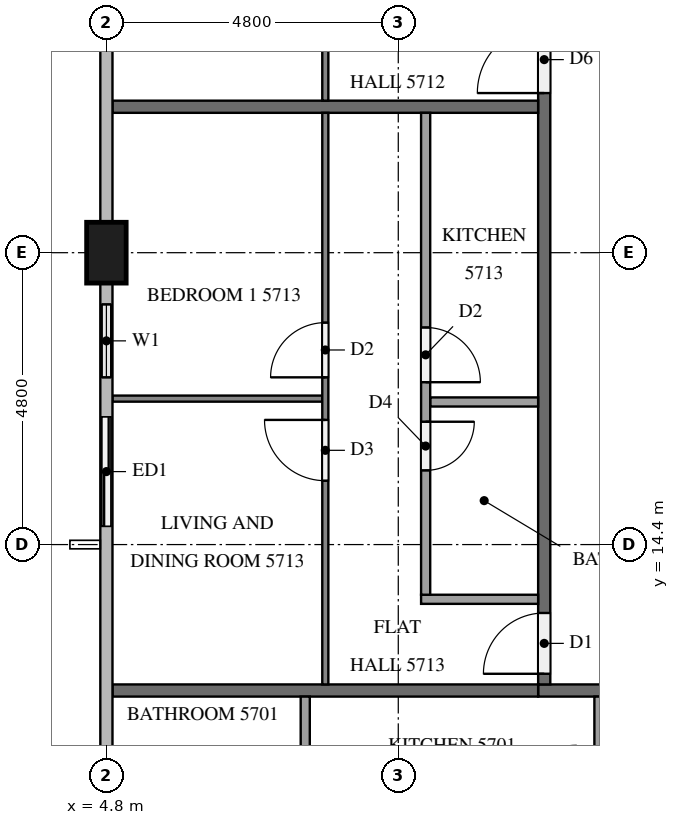
"""IFC4 building model, lengths in metres.
Left out: names, types, materials, properties, quantities, classifications, styles, units other than length and angle.
Written with IfcOpenShell. Run it as: python <this file> out.ifc"""

import sys

from ifc_helpers import new_model, si_unit, direction, frame, frame_2d, origin, origin_2d, place, context, subcontext, project, spatial, rectangle, extrude, element, fill, save


model = new_model("IFC4")
c1 = context("Model", 3, precision=1e-05, world=origin(), true_north=direction((0.0, 1.0)))
c2 = subcontext(c1, "Body", "Model", "MODEL_VIEW")
j1 = project(units=[si_unit("LENGTHUNIT", "METRE"), si_unit("PLANEANGLEUNIT", "RADIAN")], contexts=[c1])
p1 = place(None, origin())
s1 = spatial("IfcSite", under=j1, at=p1, CompositionType="ELEMENT")
p2 = place(p1, origin())
s2 = spatial("IfcBuilding", under=s1, at=p2, CompositionType="ELEMENT")
p3 = place(p2, frame((0.0, 0.0, 219.3)))
s3 = spatial("IfcBuildingStorey", under=s2, at=p3, CompositionType="ELEMENT", Elevation=219.3)
p4 = place(p3, frame((4.8, 19.2, 0.0), z_axis=(0.0, 0.0, 1.0), x_axis=(0.0, 1.0, 0.0)))
e1 = element("IfcColumn", 1, at=p4, inside=s3, PredefinedType="COLUMN", context=c2, shape_type="SweptSolid", body=[
    extrude(rectangle(XDim=1.0, YDim=0.65, at=origin_2d()), origin(), (0.0, 0.0, 1.0), 3.2),
])
p5 = place(p3, frame((4.8, 18.7, 0.0), z_axis=(0.0, 0.0, 1.0), x_axis=(0.0, -1.0, 0.0)))
e2 = element("IfcWall", 2, at=p5, inside=s3, PredefinedType="SOLIDWALL", context=c2, shape_type="SweptSolid", body=[
    extrude(rectangle(XDim=4.3, YDim=0.15, at=frame_2d((2.15, 0.0))), origin(), (0.0, 0.0, 1.0), 3.2),
])
p6 = place(p5, frame((0.35, 0.0, 0.9)))
e3 = element("IfcOpeningElement", 3, at=p6, cuts=e2, PredefinedType="OPENING", context=c2, shape_type="SweptSolid", body=[
    extrude(rectangle(XDim=1.2, YDim=1.4, at=frame_2d((0.6, 0.7))), frame((0.0, 0.085, 0.0), z_axis=(0.0, -1.0, 0.0), x_axis=(1.0, 0.0, 0.0)), (0.0, 0.0, 1.0), 0.17),
])
p7 = place(p5, frame((2.2, 0.0, 0.0)))
e4 = element("IfcOpeningElement", 4, at=p7, cuts=e2, PredefinedType="OPENING", context=c2, shape_type="SweptSolid", body=[
    extrude(rectangle(XDim=1.8, YDim=2.4, at=frame_2d((0.9, 1.2))), frame((0.0, 0.085, 0.0), z_axis=(0.0, -1.0, 0.0), x_axis=(1.0, 0.0, 0.0)), (0.0, 0.0, 1.0), 0.17),
])
p8 = place(p3, frame((50.5, 12.0, 0.0), z_axis=(0.0, 0.0, 1.0), x_axis=(-1.0, 0.0, 0.0)))
e5 = element("IfcWall", 5, at=p8, inside=s3, PredefinedType="PARTITIONING", context=c2, shape_type="SweptSolid", body=[
    extrude(rectangle(XDim=38.6, YDim=0.2, at=frame_2d((19.3, 0.0))), origin(), (0.0, 0.0, 1.0), 3.2),
])
p9 = place(p8, frame((36.375, 0.0, 0.0)))
e6 = element("IfcOpeningElement", 6, at=p9, cuts=e5, PredefinedType="OPENING", context=c2, shape_type="SweptSolid", body=[
    extrude(rectangle(XDim=1.0, YDim=2.1, at=frame_2d((0.5, 1.05))), frame((0.0, 0.11, 0.0), z_axis=(0.0, -1.0, 0.0), x_axis=(1.0, 0.0, 0.0)), (0.0, 0.0, 1.0), 0.22),
])
p10 = place(p8, frame((34.825, 0.0, 0.0)))
e7 = element("IfcOpeningElement", 7, at=p10, cuts=e5, PredefinedType="OPENING", context=c2, shape_type="SweptSolid", body=[
    extrude(rectangle(XDim=1.0, YDim=2.1, at=frame_2d((0.5, 1.05))), frame((0.0, 0.11, 0.0), z_axis=(0.0, -1.0, 0.0), x_axis=(1.0, 0.0, 0.0)), (0.0, 0.0, 1.0), 0.22),
])
p11 = place(p8, frame((20.375, 0.0, 0.0)))
e8 = element("IfcOpeningElement", 8, at=p11, cuts=e5, PredefinedType="OPENING", context=c2, shape_type="SweptSolid", body=[
    extrude(rectangle(XDim=1.1, YDim=2.1, at=frame_2d((0.55, 1.05))), frame((0.0, 0.11, 0.0), z_axis=(0.0, -1.0, 0.0), x_axis=(1.0, 0.0, 0.0)), (0.0, 0.0, 1.0), 0.22),
])
p12 = place(p8, frame((1.225, 0.0, 0.0)))
e9 = element("IfcOpeningElement", 9, at=p12, cuts=e5, PredefinedType="OPENING", context=c2, shape_type="SweptSolid", body=[
    extrude(rectangle(XDim=1.0, YDim=2.1, at=frame_2d((0.5, 1.05))), frame((0.0, 0.11, 0.0), z_axis=(0.0, -1.0, 0.0), x_axis=(1.0, 0.0, 0.0)), (0.0, 0.0, 1.0), 0.22),
])
p13 = place(p3, frame((12.0, 12.1, 0.0), z_axis=(0.0, 0.0, 1.0), x_axis=(0.0, 1.0, 0.0)))
e10 = element("IfcWall", 10, at=p13, inside=s3, PredefinedType="PARTITIONING", context=c2, shape_type="SweptSolid", body=[
    extrude(rectangle(XDim=28.6, YDim=0.2, at=frame_2d((14.3, 0.0))), origin(), (0.0, 0.0, 1.0), 3.2),
])
p14 = place(p13, frame((9.725, 0.0, 0.0)))
e11 = element("IfcOpeningElement", 11, at=p14, cuts=e10, PredefinedType="OPENING", context=c2, shape_type="SweptSolid", body=[
    extrude(rectangle(XDim=1.1, YDim=2.1, at=frame_2d((0.55, 1.05))), frame((0.0, 0.11, 0.0), z_axis=(0.0, -1.0, 0.0), x_axis=(1.0, 0.0, 0.0)), (0.0, 0.0, 1.0), 0.22),
])
p15 = place(p13, frame((0.175, 0.0, 0.0)))
e12 = element("IfcOpeningElement", 12, at=p15, cuts=e10, PredefinedType="OPENING", context=c2, shape_type="SweptSolid", body=[
    extrude(rectangle(XDim=1.0, YDim=2.1, at=frame_2d((0.5, 1.05))), frame((0.0, 0.11, 0.0), z_axis=(0.0, -1.0, 0.0), x_axis=(1.0, 0.0, 0.0)), (0.0, 0.0, 1.0), 0.22),
])
for number, where, z_axis, x_axis in (
    (13, (4.9, 12.0, 0.0), (0.0, 0.0, 1.0), (1.0, 0.0, 0.0)),
    (14, (4.9, 21.6, 0.0), (0.0, 0.0, 1.0), (1.0, 0.0, 0.0)),
):
    element("IfcWall", number, at=place(p3, frame(where, z_axis=z_axis, x_axis=x_axis)), inside=s3, PredefinedType="PARTITIONING", context=c2, shape_type="SweptSolid", body=[
        extrude(rectangle(XDim=7.0, YDim=0.2, at=frame_2d((3.5, 0.0))), origin(), (0.0, 0.0, 1.0), 3.2),
    ])
p16 = place(p3, frame((8.07, 11.9, 0.0), z_axis=(0.0, 0.0, 1.0), x_axis=(0.0, -1.0, 0.0)))
e15 = element("IfcWall", 15, at=p16, inside=s3, PredefinedType="PARTITIONING", context=c2, shape_type="SweptSolid", body=[
    extrude(rectangle(XDim=1.625, YDim=0.15, at=frame_2d((0.812, 0.0))), origin(), (0.0, 0.0, 1.0), 3.2),
])
p17 = place(p3, frame((12.9, 11.9, 0.0), z_axis=(0.0, 0.0, 1.0), x_axis=(0.0, -1.0, 0.0)))
e16 = element("IfcWall", 16, at=p17, inside=s3, PredefinedType="PARTITIONING", context=c2, shape_type="SweptSolid", body=[
    extrude(rectangle(XDim=1.775, YDim=0.15, at=frame_2d((0.887, 0.0))), origin(), (0.0, 0.0, 1.0), 3.2),
])
p18 = place(p3, frame((8.4, 21.7, 0.0), z_axis=(0.0, 0.0, 1.0), x_axis=(0.0, 1.0, 0.0)))
e17 = element("IfcWall", 17, at=p18, inside=s3, PredefinedType="PARTITIONING", context=c2, shape_type="SweptSolid", body=[
    extrude(rectangle(XDim=19.0, YDim=0.1, at=frame_2d((9.5, 0.0))), origin(), (0.0, 0.0, 1.0), 3.2),
])
p19 = place(p18, frame((3.45, 0.0, 0.0)))
e18 = element("IfcOpeningElement", 18, at=p19, cuts=e17, PredefinedType="OPENING", context=c2, shape_type="SweptSolid", body=[
    extrude(rectangle(XDim=0.9, YDim=2.1, at=frame_2d((0.45, 1.05))), frame((0.0, 0.06, 0.0), z_axis=(0.0, -1.0, 0.0), x_axis=(1.0, 0.0, 0.0)), (0.0, 0.0, 1.0), 0.12),
])
p20 = place(p18, frame((5.05, 0.0, 0.0)))
e19 = element("IfcOpeningElement", 19, at=p20, cuts=e17, PredefinedType="OPENING", context=c2, shape_type="SweptSolid", body=[
    extrude(rectangle(XDim=0.9, YDim=2.1, at=frame_2d((0.45, 1.05))), frame((0.0, 0.06, 0.0), z_axis=(0.0, -1.0, 0.0), x_axis=(1.0, 0.0, 0.0)), (0.0, 0.0, 1.0), 0.12),
])
p21 = place(p18, frame((13.05, 0.0, 0.0)))
e20 = element("IfcOpeningElement", 20, at=p21, cuts=e17, PredefinedType="OPENING", context=c2, shape_type="SweptSolid", body=[
    extrude(rectangle(XDim=0.9, YDim=2.1, at=frame_2d((0.45, 1.05))), frame((0.0, 0.06, 0.0), z_axis=(0.0, -1.0, 0.0), x_axis=(1.0, 0.0, 0.0)), (0.0, 0.0, 1.0), 0.12),
])
p22 = place(p18, frame((14.65, 0.0, 0.0)))
e21 = element("IfcOpeningElement", 21, at=p22, cuts=e17, PredefinedType="OPENING", context=c2, shape_type="SweptSolid", body=[
    extrude(rectangle(XDim=1.0, YDim=2.1, at=frame_2d((0.5, 1.05))), frame((0.0, 0.06, 0.0), z_axis=(0.0, -1.0, 0.0), x_axis=(1.0, 0.0, 0.0)), (0.0, 0.0, 1.0), 0.12),
])
p23 = place(p3, frame((8.35, 16.8, 0.0), z_axis=(0.0, 0.0, 1.0), x_axis=(-1.0, 0.0, 0.0)))
e22 = element("IfcWall", 22, at=p23, inside=s3, PredefinedType="PARTITIONING", context=c2, shape_type="SweptSolid", body=[
    extrude(rectangle(XDim=3.45, YDim=0.1, at=frame_2d((1.725, 0.0))), origin(), (0.0, 0.0, 1.0), 3.2),
])
p24 = place(p3, frame((8.4, 12.1, 0.0), z_axis=(0.0, 0.0, 1.0), x_axis=(0.0, 1.0, 0.0)))
e23 = element("IfcWall", 23, at=p24, inside=s3, PredefinedType="PARTITIONING", context=c2, shape_type="SweptSolid", body=[
    extrude(rectangle(XDim=9.4, YDim=0.1, at=frame_2d((4.7, 0.0))), origin(), (0.0, 0.0, 1.0), 3.2),
])
p25 = place(p24, frame((3.35, 0.0, 0.0)))
e24 = element("IfcOpeningElement", 24, at=p25, cuts=e23, PredefinedType="OPENING", context=c2, shape_type="SweptSolid", body=[
    extrude(rectangle(XDim=1.0, YDim=2.1, at=frame_2d((0.5, 1.05))), frame((0.0, 0.06, 0.0), z_axis=(0.0, -1.0, 0.0), x_axis=(1.0, 0.0, 0.0)), (0.0, 0.0, 1.0), 0.12),
])
p26 = place(p24, frame((5.05, 0.0, 0.0)))
e25 = element("IfcOpeningElement", 25, at=p26, cuts=e23, PredefinedType="OPENING", context=c2, shape_type="SweptSolid", body=[
    extrude(rectangle(XDim=0.9, YDim=2.1, at=frame_2d((0.45, 1.05))), frame((0.0, 0.06, 0.0), z_axis=(0.0, -1.0, 0.0), x_axis=(1.0, 0.0, 0.0)), (0.0, 0.0, 1.0), 0.12),
])
p27 = place(p3, frame((11.9, 16.745, 0.0), z_axis=(0.0, 0.0, 1.0), x_axis=(-1.0, 0.0, 0.0)))
e26 = element("IfcWall", 26, at=p27, inside=s3, PredefinedType="PARTITIONING", context=c2, shape_type="SweptSolid", body=[
    extrude(rectangle(XDim=1.775, YDim=0.15, at=frame_2d((0.887, 0.0))), origin(), (0.0, 0.0, 1.0), 3.2),
])
p28 = place(p3, frame((11.9, 13.5, 0.0), z_axis=(0.0, 0.0, 1.0), x_axis=(-1.0, 0.0, 0.0)))
e27 = element("IfcWall", 27, at=p28, inside=s3, PredefinedType="PARTITIONING", context=c2, shape_type="SweptSolid", body=[
    extrude(rectangle(XDim=1.925, YDim=0.15, at=frame_2d((0.962, 0.0))), origin(), (0.0, 0.0, 1.0), 3.2),
])
p29 = place(p3, frame((10.05, 21.5, 0.0), z_axis=(0.0, 0.0, 1.0), x_axis=(0.0, -1.0, 0.0)))
e28 = element("IfcWall", 28, at=p29, inside=s3, PredefinedType="PARTITIONING", context=c2, shape_type="SweptSolid", body=[
    extrude(rectangle(XDim=7.925, YDim=0.15, at=frame_2d((3.962, 0.0))), origin(), (0.0, 0.0, 1.0), 3.2),
])
p30 = place(p29, frame((5.08, 0.0, 0.0)))
e29 = element("IfcOpeningElement", 29, at=p30, cuts=e28, PredefinedType="OPENING", context=c2, shape_type="SweptSolid", body=[
    extrude(rectangle(XDim=0.8, YDim=2.1, at=frame_2d((0.4, 1.05))), frame((0.0, 0.085, 0.0), z_axis=(0.0, -1.0, 0.0), x_axis=(1.0, 0.0, 0.0)), (0.0, 0.0, 1.0), 0.17),
])
p31 = place(p29, frame((3.53, 0.0, 0.0)))
e30 = element("IfcOpeningElement", 30, at=p31, cuts=e28, PredefinedType="OPENING", context=c2, shape_type="SweptSolid", body=[
    extrude(rectangle(XDim=0.9, YDim=2.1, at=frame_2d((0.45, 1.05))), frame((0.0, 0.085, 0.0), z_axis=(0.0, -1.0, 0.0), x_axis=(1.0, 0.0, 0.0)), (0.0, 0.0, 1.0), 0.17),
])
p32 = place(p6, origin())
e31 = element("IfcWindow", 31, at=p32, inside=s3, PartitioningType="SINGLE_PANEL", PredefinedType="WINDOW", context=c2, shape_type="SweptSolid", body=[
    extrude(rectangle(XDim=1.2, YDim=1.4, at=frame_2d((0.6, 0.7))), frame((0.0, 0.03, 0.0), z_axis=(0.0, -1.0, 0.0), x_axis=(1.0, 0.0, 0.0)), (0.0, 0.0, 1.0), 0.06),
])
fill(e3, e31)
p33 = place(p7, origin())
e32 = element("IfcDoor", 32, at=p33, inside=s3, OperationType="SLIDING_TO_LEFT", PredefinedType="DOOR", context=c2, shape_type="SweptSolid", body=[
    extrude(rectangle(XDim=1.8, YDim=2.4, at=frame_2d((0.9, 1.2))), frame((0.0, 0.025, 0.0), z_axis=(0.0, -1.0, 0.0), x_axis=(1.0, 0.0, 0.0)), (0.0, 0.0, 1.0), 0.05),
])
fill(e4, e32)
p34 = place(p14, origin())
e33 = element("IfcDoor", 33, at=p34, inside=s3, OperationType="SINGLE_SWING_LEFT", PredefinedType="DOOR", context=c2, shape_type="SweptSolid", body=[
    extrude(rectangle(XDim=1.1, YDim=2.1, at=frame_2d((0.55, 1.05))), frame((0.0, 0.025, 0.0), z_axis=(0.0, -1.0, 0.0), x_axis=(1.0, 0.0, 0.0)), (0.0, 0.0, 1.0), 0.05),
])
fill(e11, e33)
p35 = place(p15, origin())
e34 = element("IfcDoor", 34, at=p35, inside=s3, OperationType="SINGLE_SWING_LEFT", PredefinedType="DOOR", context=c2, shape_type="SweptSolid", body=[
    extrude(rectangle(XDim=1.0, YDim=2.1, at=frame_2d((0.5, 1.05))), frame((0.0, 0.025, 0.0), z_axis=(0.0, -1.0, 0.0), x_axis=(1.0, 0.0, 0.0)), (0.0, 0.0, 1.0), 0.05),
])
fill(e12, e34)
p36 = place(p25, origin())
e35 = element("IfcDoor", 35, at=p36, inside=s3, OperationType="SINGLE_SWING_RIGHT", PredefinedType="DOOR", context=c2, shape_type="SweptSolid", body=[
    extrude(rectangle(XDim=1.0, YDim=2.1, at=frame_2d((0.5, 1.05))), frame((0.0, 0.025, 0.0), z_axis=(0.0, -1.0, 0.0), x_axis=(1.0, 0.0, 0.0)), (0.0, 0.0, 1.0), 0.05),
])
fill(e24, e35)
p37 = place(p26, origin())
e36 = element("IfcDoor", 36, at=p37, inside=s3, OperationType="SINGLE_SWING_LEFT", PredefinedType="DOOR", context=c2, shape_type="SweptSolid", body=[
    extrude(rectangle(XDim=0.9, YDim=2.1, at=frame_2d((0.45, 1.05))), frame((0.0, 0.025, 0.0), z_axis=(0.0, -1.0, 0.0), x_axis=(1.0, 0.0, 0.0)), (0.0, 0.0, 1.0), 0.05),
])
fill(e25, e36)
p38 = place(p30, origin())
e37 = element("IfcDoor", 37, at=p38, inside=s3, OperationType="SINGLE_SWING_LEFT", PredefinedType="DOOR", context=c2, shape_type="SweptSolid", body=[
    extrude(rectangle(XDim=0.8, YDim=2.1, at=frame_2d((0.4, 1.05))), frame((0.0, 0.025, 0.0), z_axis=(0.0, -1.0, 0.0), x_axis=(1.0, 0.0, 0.0)), (0.0, 0.0, 1.0), 0.05),
])
fill(e29, e37)
p39 = place(p31, origin())
e38 = element("IfcDoor", 38, at=p39, inside=s3, OperationType="SINGLE_SWING_RIGHT", PredefinedType="DOOR", context=c2, shape_type="SweptSolid", body=[
    extrude(rectangle(XDim=0.9, YDim=2.1, at=frame_2d((0.45, 1.05))), frame((0.0, 0.025, 0.0), z_axis=(0.0, -1.0, 0.0), x_axis=(1.0, 0.0, 0.0)), (0.0, 0.0, 1.0), 0.05),
])
fill(e30, e38)
save(model, sys.argv[1])
